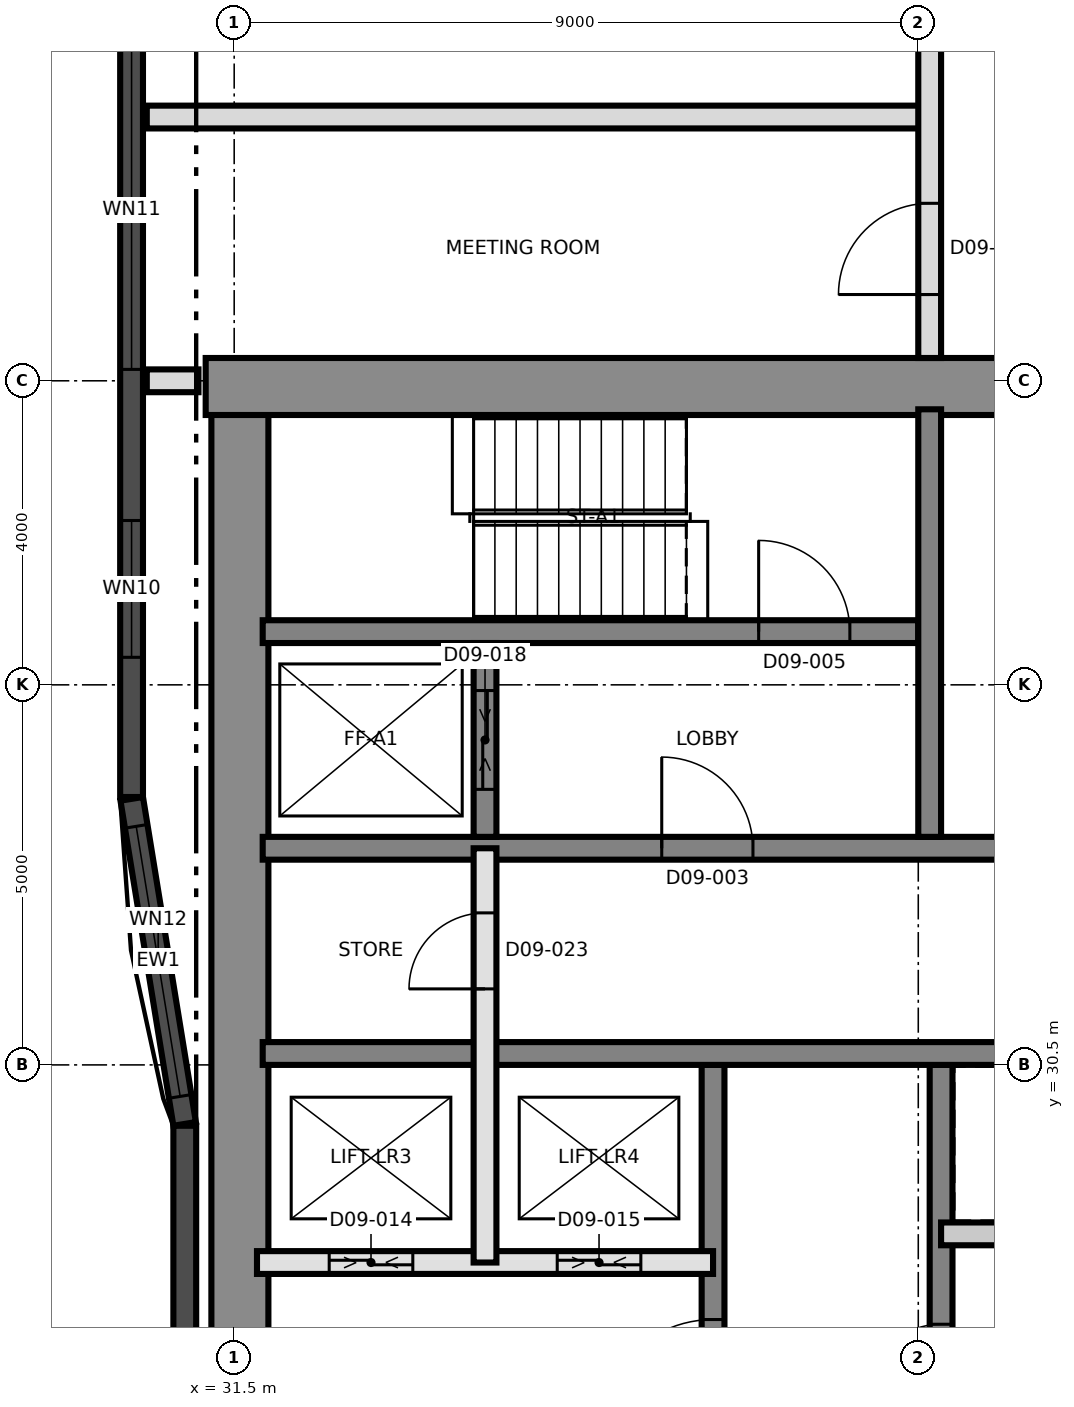
"""IFC4 building model, lengths in metres.
Left out: names, types, materials, properties, quantities, classifications, styles, units other than length and angle.
Written with IfcOpenShell. Run it as: python <this file> out.ifc"""

import sys

from ifc_helpers import new_model, si_unit, direction, frame, frame_2d, origin, place, context, subcontext, project, spatial, rectangle, extrude, element, fill, save


model = new_model("IFC4")
c1 = context("Model", 3, precision=1e-05, world=origin(), true_north=direction((0.0, 1.0)))
c2 = subcontext(c1, "Body", "Model", "MODEL_VIEW")
j1 = project(units=[si_unit("LENGTHUNIT", "METRE"), si_unit("PLANEANGLEUNIT", "RADIAN")], contexts=[c1])
p1 = place(None, origin())
s1 = spatial("IfcSite", under=j1, at=p1, CompositionType="ELEMENT")
p2 = place(p1, origin())
s2 = spatial("IfcBuilding", under=s1, at=p2, CompositionType="ELEMENT")
p3 = place(p2, frame((0.0, 0.0, 109.3)))
s3 = spatial("IfcBuildingStorey", under=s2, at=p3, CompositionType="ELEMENT", Elevation=109.3)
p4 = place(p3, frame((31.575, 21.875, 0.0), z_axis=(0.0, 0.0, 1.0), x_axis=(0.0, 1.0, 0.0)))
e1 = element("IfcWall", 1, at=p4, inside=s3, PredefinedType="SHEAR", context=c2, shape_type="SweptSolid", body=[
    extrude(rectangle(XDim=17.25, YDim=0.75, at=frame_2d((8.625, 0.0))), origin(), (0.0, 0.0, 1.0), 3.7),
])
p5 = place(p3, frame((31.125, 39.425, 0.0), z_axis=(0.0, 0.0, 1.0), x_axis=(1.0, 0.0, 0.0)))
e2 = element("IfcWall", 2, at=p5, inside=s3, PredefinedType="SHEAR", context=c2, shape_type="SweptSolid", body=[
    extrude(rectangle(XDim=27.0, YDim=0.75, at=frame_2d((13.5, 0.0))), origin(), (0.0, 0.0, 1.0), 3.7),
])
p6 = place(p5, frame((10.575, 0.0, 0.0)))
e3 = element("IfcOpeningElement", 3, at=p6, cuts=e2, PredefinedType="OPENING", context=c2, shape_type="SweptSolid", body=[
    extrude(rectangle(XDim=1.2, YDim=2.1, at=frame_2d((0.6, 1.05))), frame((0.0, 0.385, 0.0), z_axis=(0.0, -1.0, 0.0), x_axis=(1.0, 0.0, 0.0)), (0.0, 0.0, 1.0), 0.77),
])
p7 = place(p3, frame((37.8, 21.875, 0.0), z_axis=(0.0, 0.0, 1.0), x_axis=(0.0, 1.0, 0.0)))
e4 = element("IfcWall", 4, at=p7, inside=s3, PredefinedType="SHEAR", context=c2, shape_type="SweptSolid", body=[
    extrude(rectangle(XDim=8.625, YDim=0.3, at=frame_2d((4.312, 0.0))), origin(), (0.0, 0.0, 1.0), 3.7),
])
p8 = place(p7, frame((3.775, 0.0, 0.0)))
e5 = element("IfcOpeningElement", 5, at=p8, cuts=e4, PredefinedType="OPENING", context=c2, shape_type="SweptSolid", body=[
    extrude(rectangle(XDim=1.5, YDim=2.1, at=frame_2d((0.75, 1.05))), frame((0.0, 0.16, 0.0), z_axis=(0.0, -1.0, 0.0), x_axis=(1.0, 0.0, 0.0)), (0.0, 0.0, 1.0), 0.32),
])
p9 = place(p3, frame((40.8, 21.875, 0.0), z_axis=(0.0, 0.0, 1.0), x_axis=(0.0, 1.0, 0.0)))
e6 = element("IfcWall", 6, at=p9, inside=s3, PredefinedType="SHEAR", context=c2, shape_type="SweptSolid", body=[
    extrude(rectangle(XDim=8.625, YDim=0.3, at=frame_2d((4.312, 0.0))), origin(), (0.0, 0.0, 1.0), 3.7),
])
p10 = place(p9, frame((4.213, 0.0, 0.0)))
e7 = element("IfcOpeningElement", 7, at=p10, cuts=e6, PredefinedType="OPENING", context=c2, shape_type="SweptSolid", body=[
    extrude(rectangle(XDim=1.0, YDim=2.1, at=frame_2d((0.5, 1.05))), frame((0.0, 0.16, 0.0), z_axis=(0.0, -1.0, 0.0), x_axis=(1.0, 0.0, 0.0)), (0.0, 0.0, 1.0), 0.32),
])
p11 = place(p3, frame((31.875, 30.65, 0.0), z_axis=(0.0, 0.0, 1.0), x_axis=(1.0, 0.0, 0.0)))
e8 = element("IfcWall", 8, at=p11, inside=s3, PredefinedType="SHEAR", context=c2, shape_type="SweptSolid", body=[
    extrude(rectangle(XDim=26.25, YDim=0.3, at=frame_2d((13.125, 0.0))), origin(), (0.0, 0.0, 1.0), 3.7),
])
p12 = place(p11, frame((24.625, 0.0, 0.0)))
e9 = element("IfcOpeningElement", 9, at=p12, cuts=e8, PredefinedType="OPENING", context=c2, shape_type="SweptSolid", body=[
    extrude(rectangle(XDim=1.0, YDim=2.1, at=frame_2d((0.5, 1.05))), frame((0.0, 0.16, 0.0), z_axis=(0.0, -1.0, 0.0), x_axis=(1.0, 0.0, 0.0)), (0.0, 0.0, 1.0), 0.32),
])
p13 = place(p11, frame((11.425, 0.0, 0.0)))
e10 = element("IfcOpeningElement", 10, at=p13, cuts=e8, PredefinedType="OPENING", context=c2, shape_type="SweptSolid", body=[
    extrude(rectangle(XDim=1.0, YDim=2.1, at=frame_2d((0.5, 1.05))), frame((0.0, 0.16, 0.0), z_axis=(0.0, -1.0, 0.0), x_axis=(1.0, 0.0, 0.0)), (0.0, 0.0, 1.0), 0.32),
])
p14 = place(p3, frame((31.875, 33.35, 0.0), z_axis=(0.0, 0.0, 1.0), x_axis=(1.0, 0.0, 0.0)))
e11 = element("IfcWall", 11, at=p14, inside=s3, PredefinedType="SHEAR", context=c2, shape_type="SweptSolid", body=[
    extrude(rectangle(XDim=26.25, YDim=0.3, at=frame_2d((13.125, 0.0))), origin(), (0.0, 0.0, 1.0), 3.7),
])
p15 = place(p14, frame((13.775, 0.0, 0.0)))
e12 = element("IfcOpeningElement", 12, at=p15, cuts=e11, PredefinedType="OPENING", context=c2, shape_type="SweptSolid", body=[
    extrude(rectangle(XDim=1.4, YDim=2.1, at=frame_2d((0.7, 1.05))), frame((0.0, 0.16, 0.0), z_axis=(0.0, -1.0, 0.0), x_axis=(1.0, 0.0, 0.0)), (0.0, 0.0, 1.0), 0.32),
])
p16 = place(p14, frame((5.25, 0.0, 0.0)))
e13 = element("IfcOpeningElement", 13, at=p16, cuts=e11, PredefinedType="OPENING", context=c2, shape_type="SweptSolid", body=[
    extrude(rectangle(XDim=1.2, YDim=2.1, at=frame_2d((0.6, 1.05))), frame((0.0, 0.16, 0.0), z_axis=(0.0, -1.0, 0.0), x_axis=(1.0, 0.0, 0.0)), (0.0, 0.0, 1.0), 0.32),
])
p17 = place(p14, frame((19.8, 0.0, 0.0)))
e14 = element("IfcOpeningElement", 14, at=p17, cuts=e11, PredefinedType="OPENING", context=c2, shape_type="SweptSolid", body=[
    extrude(rectangle(XDim=1.2, YDim=2.1, at=frame_2d((0.6, 1.05))), frame((0.0, 0.16, 0.0), z_axis=(0.0, -1.0, 0.0), x_axis=(1.0, 0.0, 0.0)), (0.0, 0.0, 1.0), 0.32),
])
p18 = place(p3, frame((31.875, 36.2, 0.0), z_axis=(0.0, 0.0, 1.0), x_axis=(1.0, 0.0, 0.0)))
e15 = element("IfcWall", 15, at=p18, inside=s3, PredefinedType="SHEAR", context=c2, shape_type="SweptSolid", body=[
    extrude(rectangle(XDim=8.625, YDim=0.3, at=frame_2d((4.312, 0.0))), origin(), (0.0, 0.0, 1.0), 3.7),
])
p19 = place(p18, frame((6.525, 0.0, 0.0)))
e16 = element("IfcOpeningElement", 16, at=p19, cuts=e15, PredefinedType="OPENING", context=c2, shape_type="SweptSolid", body=[
    extrude(rectangle(XDim=1.2, YDim=2.1, at=frame_2d((0.6, 1.05))), frame((0.0, 0.16, 0.0), z_axis=(0.0, -1.0, 0.0), x_axis=(1.0, 0.0, 0.0)), (0.0, 0.0, 1.0), 0.32),
])
p20 = place(p3, frame((40.65, 33.5, 0.0), z_axis=(0.0, 0.0, 1.0), x_axis=(0.0, 1.0, 0.0)))
e17 = element("IfcWall", 17, at=p20, inside=s3, PredefinedType="SHEAR", context=c2, shape_type="SweptSolid", body=[
    extrude(rectangle(XDim=5.625, YDim=0.3, at=frame_2d((2.812, 0.0))), origin(), (0.0, 0.0, 1.0), 3.7),
])
p21 = place(p3, frame((34.8, 33.5, 0.0), z_axis=(0.0, 0.0, 1.0), x_axis=(0.0, 1.0, 0.0)))
e18 = element("IfcWall", 18, at=p21, inside=s3, PredefinedType="SHEAR", context=c2, shape_type="SweptSolid", body=[
    extrude(rectangle(XDim=2.55, YDim=0.3, at=frame_2d((1.275, 0.0))), origin(), (0.0, 0.0, 1.0), 3.7),
])
p22 = place(p21, frame((0.625, 0.0, 0.0)))
e19 = element("IfcOpeningElement", 19, at=p22, cuts=e18, PredefinedType="OPENING", context=c2, shape_type="SweptSolid", body=[
    extrude(rectangle(XDim=1.3, YDim=2.4, at=frame_2d((0.65, 1.2))), frame((0.0, 0.16, 0.0), z_axis=(0.0, -1.0, 0.0), x_axis=(1.0, 0.0, 0.0)), (0.0, 0.0, 1.0), 0.32),
])
p23 = place(p3, frame((30.85, 29.699, 0.0), z_axis=(0.0, 0.0, 1.0), x_axis=(0.0, -1.0, 0.0)))
e20 = element("IfcWall", 20, at=p23, inside=s3, PredefinedType="SOLIDWALL", context=c2, shape_type="SweptSolid", body=[
    extrude(rectangle(XDim=8.34, YDim=0.3, at=frame_2d((4.17, 0.0))), origin(), (0.0, 0.0, 1.0), 3.4),
])
p24 = place(p3, frame((30.15, 66.992, 0.0), z_axis=(0.0, 0.0, 1.0), x_axis=(0.0, -1.0, 0.0)))
e21 = element("IfcWall", 21, at=p24, inside=s3, PredefinedType="SOLIDWALL", context=c2, shape_type="SweptSolid", body=[
    extrude(rectangle(XDim=32.968, YDim=0.3, at=frame_2d((16.484, 0.0))), origin(), (0.0, 0.0, 1.0), 3.4),
])
p25 = place(p24, frame((1.596, 0.0, 0.3)))
e22 = element("IfcOpeningElement", 22, at=p25, cuts=e21, PredefinedType="OPENING", context=c2, shape_type="SweptSolid", body=[
    extrude(rectangle(XDim=1.8, YDim=2.4, at=frame_2d((0.9, 1.2))), frame((0.0, 0.16, 0.0), z_axis=(0.0, -1.0, 0.0), x_axis=(1.0, 0.0, 0.0)), (0.0, 0.0, 1.0), 0.32),
])
p26 = place(p24, frame((5.142, 0.0, 0.9)))
e23 = element("IfcOpeningElement", 23, at=p26, cuts=e21, PredefinedType="OPENING", context=c2, shape_type="SweptSolid", body=[
    extrude(rectangle(XDim=4.2, YDim=1.5, at=frame_2d((2.1, 0.75))), frame((0.0, 0.16, 0.0), z_axis=(0.0, -1.0, 0.0), x_axis=(1.0, 0.0, 0.0)), (0.0, 0.0, 1.0), 0.32),
])
p27 = place(p24, frame((9.642, 0.0, 0.9)))
e24 = element("IfcOpeningElement", 24, at=p27, cuts=e21, PredefinedType="OPENING", context=c2, shape_type="SweptSolid", body=[
    extrude(rectangle(XDim=4.2, YDim=1.5, at=frame_2d((2.1, 0.75))), frame((0.0, 0.16, 0.0), z_axis=(0.0, -1.0, 0.0), x_axis=(1.0, 0.0, 0.0)), (0.0, 0.0, 1.0), 0.32),
])
p28 = place(p24, frame((14.142, 0.0, 0.9)))
e25 = element("IfcOpeningElement", 25, at=p28, cuts=e21, PredefinedType="OPENING", context=c2, shape_type="SweptSolid", body=[
    extrude(rectangle(XDim=4.2, YDim=1.5, at=frame_2d((2.1, 0.75))), frame((0.0, 0.16, 0.0), z_axis=(0.0, -1.0, 0.0), x_axis=(1.0, 0.0, 0.0)), (0.0, 0.0, 1.0), 0.32),
])
p29 = place(p24, frame((18.642, 0.0, 0.9)))
e26 = element("IfcOpeningElement", 26, at=p29, cuts=e21, PredefinedType="OPENING", context=c2, shape_type="SweptSolid", body=[
    extrude(rectangle(XDim=4.2, YDim=1.5, at=frame_2d((2.1, 0.75))), frame((0.0, 0.16, 0.0), z_axis=(0.0, -1.0, 0.0), x_axis=(1.0, 0.0, 0.0)), (0.0, 0.0, 1.0), 0.32),
])
p30 = place(p24, frame((23.142, 0.0, 0.9)))
e27 = element("IfcOpeningElement", 27, at=p30, cuts=e21, PredefinedType="OPENING", context=c2, shape_type="SweptSolid", body=[
    extrude(rectangle(XDim=4.2, YDim=1.5, at=frame_2d((2.1, 0.75))), frame((0.0, 0.16, 0.0), z_axis=(0.0, -1.0, 0.0), x_axis=(1.0, 0.0, 0.0)), (0.0, 0.0, 1.0), 0.32),
])
p31 = place(p24, frame((29.33, 0.0, 0.3)))
e28 = element("IfcOpeningElement", 28, at=p31, cuts=e21, PredefinedType="OPENING", context=c2, shape_type="SweptSolid", body=[
    extrude(rectangle(XDim=1.8, YDim=2.4, at=frame_2d((0.9, 1.2))), frame((0.0, 0.16, 0.0), z_axis=(0.0, -1.0, 0.0), x_axis=(1.0, 0.0, 0.0)), (0.0, 0.0, 1.0), 0.32),
])
p32 = place(p3, frame((30.152, 34.0, 0.0), z_axis=(0.0, 0.0, 1.0), x_axis=(0.160697303067, -0.987003736967, 0.0)))
e29 = element("IfcWall", 29, at=p32, inside=s3, PredefinedType="SOLIDWALL", context=c2, shape_type="SweptSolid", body=[
    extrude(rectangle(XDim=4.333, YDim=0.3, at=frame_2d((2.167, 0.0))), origin(), (0.0, 0.0, 1.0), 3.4),
])
p33 = place(p32, frame((0.366, 0.0, 0.9)))
e30 = element("IfcOpeningElement", 30, at=p33, cuts=e29, PredefinedType="OPENING", context=c2, shape_type="SweptSolid", body=[
    extrude(rectangle(XDim=3.6, YDim=1.5, at=frame_2d((1.8, 0.75))), frame((0.0, 0.16, 0.0), z_axis=(0.0, -1.0, 0.0), x_axis=(1.0, 0.0, 0.0)), (0.0, 0.0, 1.0), 0.32),
])
p34 = place(p3, frame((31.8, 27.9, 0.0), z_axis=(0.0, 0.0, 1.0), x_axis=(1.0, 0.0, 0.0)))
e31 = element("IfcWall", 31, at=p34, inside=s3, PredefinedType="SOLIDWALL", context=c2, shape_type="SweptSolid", body=[
    extrude(rectangle(XDim=6.0, YDim=0.3, at=frame_2d((3.0, 0.0))), origin(), (0.0, 0.0, 1.0), 3.4),
])
p35 = place(p34, frame((0.95, 0.0, 0.0)))
e32 = element("IfcOpeningElement", 32, at=p35, cuts=e31, PredefinedType="OPENING", context=c2, shape_type="SweptSolid", body=[
    extrude(rectangle(XDim=1.1, YDim=2.4, at=frame_2d((0.55, 1.2))), frame((0.0, 0.16, 0.0), z_axis=(0.0, -1.0, 0.0), x_axis=(1.0, 0.0, 0.0)), (0.0, 0.0, 1.0), 0.32),
])
p36 = place(p34, frame((3.95, 0.0, 0.0)))
e33 = element("IfcOpeningElement", 33, at=p36, cuts=e31, PredefinedType="OPENING", context=c2, shape_type="SweptSolid", body=[
    extrude(rectangle(XDim=1.1, YDim=2.4, at=frame_2d((0.55, 1.2))), frame((0.0, 0.16, 0.0), z_axis=(0.0, -1.0, 0.0), x_axis=(1.0, 0.0, 0.0)), (0.0, 0.0, 1.0), 0.32),
])
p37 = place(p3, frame((40.8, 28.277, 0.0), z_axis=(0.0, 0.0, 1.0), x_axis=(1.0, 0.0, 0.0)))
e34 = element("IfcWall", 34, at=p37, inside=s3, PredefinedType="PARTITIONING", context=c2, shape_type="SweptSolid", body=[
    extrude(rectangle(XDim=6.0, YDim=0.3, at=frame_2d((3.0, 0.0))), origin(), (0.0, 0.0, 1.0), 3.4),
])
p38 = place(p3, frame((34.8, 27.9, 0.0), z_axis=(0.0, 0.0, 1.0), x_axis=(0.0, 1.0, 0.0)))
e35 = element("IfcWall", 35, at=p38, inside=s3, PredefinedType="SOLIDWALL", context=c2, shape_type="SweptSolid", body=[
    extrude(rectangle(XDim=5.45, YDim=0.3, at=frame_2d((2.725, 0.0))), origin(), (0.0, 0.0, 1.0), 3.4),
])
p39 = place(p38, frame((3.6, 0.0, 0.0)))
e36 = element("IfcOpeningElement", 36, at=p39, cuts=e35, PredefinedType="OPENING", context=c2, shape_type="SweptSolid", body=[
    extrude(rectangle(XDim=1.0, YDim=2.1, at=frame_2d((0.5, 1.05))), frame((0.0, 0.16, 0.0), z_axis=(0.0, -1.0, 0.0), x_axis=(1.0, 0.0, 0.0)), (0.0, 0.0, 1.0), 0.32),
])
p40 = place(p3, frame((30.35, 39.5, 0.0), z_axis=(0.0, 0.0, 1.0), x_axis=(1.0, 0.0, 0.0)))
e37 = element("IfcWall", 37, at=p40, inside=s3, PredefinedType="PARTITIONING", context=c2, shape_type="SweptSolid", body=[
    extrude(rectangle(XDim=0.68, YDim=0.3, at=frame_2d((0.34, 0.0))), origin(), (0.0, 0.0, 1.0), 3.4),
])
p41 = place(p3, frame((30.35, 42.97, 0.0), z_axis=(0.0, 0.0, 1.0), x_axis=(1.0, 0.0, 0.0)))
e38 = element("IfcWall", 38, at=p41, inside=s3, PredefinedType="PARTITIONING", context=c2, shape_type="SweptSolid", body=[
    extrude(rectangle(XDim=10.3, YDim=0.3, at=frame_2d((5.15, 0.0))), origin(), (0.0, 0.0, 1.0), 3.4),
])
p42 = place(p3, frame((40.65, 39.8, 0.0), z_axis=(0.0, 0.0, 1.0), x_axis=(0.0, 1.0, 0.0)))
e39 = element("IfcWall", 39, at=p42, inside=s3, PredefinedType="PARTITIONING", context=c2, shape_type="SweptSolid", body=[
    extrude(rectangle(XDim=37.09, YDim=0.3, at=frame_2d((18.545, 0.0))), origin(), (0.0, 0.0, 1.0), 3.4),
])
p43 = place(p42, frame((0.835, 0.0, 0.0)))
e40 = element("IfcOpeningElement", 40, at=p43, cuts=e39, PredefinedType="OPENING", context=c2, shape_type="SweptSolid", body=[
    extrude(rectangle(XDim=1.2, YDim=2.1, at=frame_2d((0.6, 1.05))), frame((0.0, 0.16, 0.0), z_axis=(0.0, -1.0, 0.0), x_axis=(1.0, 0.0, 0.0)), (0.0, 0.0, 1.0), 0.32),
])
p44 = place(p42, frame((4.085, 0.0, 0.0)))
e41 = element("IfcOpeningElement", 41, at=p44, cuts=e39, PredefinedType="OPENING", context=c2, shape_type="SweptSolid", body=[
    extrude(rectangle(XDim=1.0, YDim=2.1, at=frame_2d((0.5, 1.05))), frame((0.0, 0.16, 0.0), z_axis=(0.0, -1.0, 0.0), x_axis=(1.0, 0.0, 0.0)), (0.0, 0.0, 1.0), 0.32),
])
p45 = place(p42, frame((11.62, 0.0, 0.0)))
e42 = element("IfcOpeningElement", 42, at=p45, cuts=e39, PredefinedType="OPENING", context=c2, shape_type="SweptSolid", body=[
    extrude(rectangle(XDim=1.0, YDim=2.4, at=frame_2d((0.5, 1.2))), frame((0.0, 0.16, 0.0), z_axis=(0.0, -1.0, 0.0), x_axis=(1.0, 0.0, 0.0)), (0.0, 0.0, 1.0), 0.32),
])
p46 = place(p42, frame((13.27, 0.0, 0.0)))
e43 = element("IfcOpeningElement", 43, at=p46, cuts=e39, PredefinedType="OPENING", context=c2, shape_type="SweptSolid", body=[
    extrude(rectangle(XDim=1.0, YDim=2.4, at=frame_2d((0.5, 1.2))), frame((0.0, 0.16, 0.0), z_axis=(0.0, -1.0, 0.0), x_axis=(1.0, 0.0, 0.0)), (0.0, 0.0, 1.0), 0.32),
])
p47 = place(p42, frame((21.2, 0.0, 0.0)))
e44 = element("IfcOpeningElement", 44, at=p47, cuts=e39, PredefinedType="OPENING", context=c2, shape_type="SweptSolid", body=[
    extrude(rectangle(XDim=1.0, YDim=2.4, at=frame_2d((0.5, 1.2))), frame((0.0, 0.16, 0.0), z_axis=(0.0, -1.0, 0.0), x_axis=(1.0, 0.0, 0.0)), (0.0, 0.0, 1.0), 0.32),
])
p48 = place(p30, origin())
e45 = element("IfcWindow", 45, at=p48, inside=s3, PartitioningType="SINGLE_PANEL", PredefinedType="WINDOW", context=c2, shape_type="SweptSolid", body=[
    extrude(rectangle(XDim=4.2, YDim=1.5, at=frame_2d((2.1, 0.75))), frame((0.0, 0.03, 0.0), z_axis=(0.0, -1.0, 0.0), x_axis=(1.0, 0.0, 0.0)), (0.0, 0.0, 1.0), 0.06),
])
fill(e27, e45)
p49 = place(p31, origin())
e46 = element("IfcWindow", 46, at=p49, inside=s3, PartitioningType="SINGLE_PANEL", PredefinedType="WINDOW", context=c2, shape_type="SweptSolid", body=[
    extrude(rectangle(XDim=1.8, YDim=2.4, at=frame_2d((0.9, 1.2))), frame((0.0, 0.03, 0.0), z_axis=(0.0, -1.0, 0.0), x_axis=(1.0, 0.0, 0.0)), (0.0, 0.0, 1.0), 0.06),
])
fill(e28, e46)
p50 = place(p33, origin())
e47 = element("IfcWindow", 47, at=p50, inside=s3, PartitioningType="SINGLE_PANEL", PredefinedType="WINDOW", context=c2, shape_type="SweptSolid", body=[
    extrude(rectangle(XDim=3.6, YDim=1.5, at=frame_2d((1.8, 0.75))), frame((0.0, 0.03, 0.0), z_axis=(0.0, -1.0, 0.0), x_axis=(1.0, 0.0, 0.0)), (0.0, 0.0, 1.0), 0.06),
])
fill(e30, e47)
p51 = place(p8, origin())
e48 = element("IfcDoor", 48, at=p51, inside=s3, OperationType="SINGLE_SWING_LEFT", PredefinedType="DOOR", context=c2, shape_type="SweptSolid", body=[
    extrude(rectangle(XDim=1.5, YDim=2.1, at=frame_2d((0.75, 1.05))), frame((0.0, 0.025, 0.0), z_axis=(0.0, -1.0, 0.0), x_axis=(1.0, 0.0, 0.0)), (0.0, 0.0, 1.0), 0.05),
])
fill(e5, e48)
p52 = place(p16, origin())
e49 = element("IfcDoor", 49, at=p52, inside=s3, OperationType="SINGLE_SWING_LEFT", PredefinedType="DOOR", context=c2, shape_type="SweptSolid", body=[
    extrude(rectangle(XDim=1.2, YDim=2.1, at=frame_2d((0.6, 1.05))), frame((0.0, 0.025, 0.0), z_axis=(0.0, -1.0, 0.0), x_axis=(1.0, 0.0, 0.0)), (0.0, 0.0, 1.0), 0.05),
])
fill(e13, e49)
p53 = place(p19, origin())
e50 = element("IfcDoor", 50, at=p53, inside=s3, OperationType="SINGLE_SWING_RIGHT", PredefinedType="DOOR", context=c2, shape_type="SweptSolid", body=[
    extrude(rectangle(XDim=1.2, YDim=2.1, at=frame_2d((0.6, 1.05))), frame((0.0, 0.025, 0.0), z_axis=(0.0, -1.0, 0.0), x_axis=(1.0, 0.0, 0.0)), (0.0, 0.0, 1.0), 0.05),
])
fill(e16, e50)
p54 = place(p35, origin())
e51 = element("IfcDoor", 51, at=p54, inside=s3, OperationType="SLIDING_TO_LEFT", PredefinedType="DOOR", context=c2, shape_type="SweptSolid", body=[
    extrude(rectangle(XDim=1.1, YDim=2.4, at=frame_2d((0.55, 1.2))), frame((0.0, 0.025, 0.0), z_axis=(0.0, -1.0, 0.0), x_axis=(1.0, 0.0, 0.0)), (0.0, 0.0, 1.0), 0.05),
])
fill(e32, e51)
p55 = place(p36, origin())
e52 = element("IfcDoor", 52, at=p55, inside=s3, OperationType="SLIDING_TO_LEFT", PredefinedType="DOOR", context=c2, shape_type="SweptSolid", body=[
    extrude(rectangle(XDim=1.1, YDim=2.4, at=frame_2d((0.55, 1.2))), frame((0.0, 0.025, 0.0), z_axis=(0.0, -1.0, 0.0), x_axis=(1.0, 0.0, 0.0)), (0.0, 0.0, 1.0), 0.05),
])
fill(e33, e52)
p56 = place(p22, origin())
e53 = element("IfcDoor", 53, at=p56, inside=s3, OperationType="SLIDING_TO_LEFT", PredefinedType="DOOR", context=c2, shape_type="SweptSolid", body=[
    extrude(rectangle(XDim=1.3, YDim=2.4, at=frame_2d((0.65, 1.2))), frame((0.0, 0.025, 0.0), z_axis=(0.0, -1.0, 0.0), x_axis=(1.0, 0.0, 0.0)), (0.0, 0.0, 1.0), 0.05),
])
fill(e19, e53)
p57 = place(p10, origin())
e54 = element("IfcDoor", 54, at=p57, inside=s3, OperationType="SINGLE_SWING_RIGHT", PredefinedType="DOOR", context=c2, shape_type="SweptSolid", body=[
    extrude(rectangle(XDim=1.0, YDim=2.1, at=frame_2d((0.5, 1.05))), frame((0.0, 0.025, 0.0), z_axis=(0.0, -1.0, 0.0), x_axis=(1.0, 0.0, 0.0)), (0.0, 0.0, 1.0), 0.05),
])
fill(e7, e54)
p58 = place(p39, origin())
e55 = element("IfcDoor", 55, at=p58, inside=s3, OperationType="SINGLE_SWING_RIGHT", PredefinedType="DOOR", context=c2, shape_type="SweptSolid", body=[
    extrude(rectangle(XDim=1.0, YDim=2.1, at=frame_2d((0.5, 1.05))), frame((0.0, 0.025, 0.0), z_axis=(0.0, -1.0, 0.0), x_axis=(1.0, 0.0, 0.0)), (0.0, 0.0, 1.0), 0.05),
])
fill(e36, e55)
p59 = place(p43, origin())
e56 = element("IfcDoor", 56, at=p59, inside=s3, OperationType="SINGLE_SWING_RIGHT", PredefinedType="DOOR", context=c2, shape_type="SweptSolid", body=[
    extrude(rectangle(XDim=1.2, YDim=2.1, at=frame_2d((0.6, 1.05))), frame((0.0, 0.025, 0.0), z_axis=(0.0, -1.0, 0.0), x_axis=(1.0, 0.0, 0.0)), (0.0, 0.0, 1.0), 0.05),
])
fill(e40, e56)
save(model, sys.argv[1])
